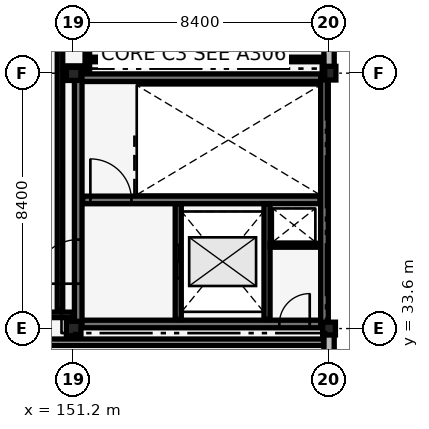
"""IFC4 building model, lengths in metres.
Left out: names, types, materials, properties, quantities, classifications, styles, units other than length and angle.
Written with IfcOpenShell. Run it as: python <this file> out.ifc"""

import sys

from ifc_helpers import new_model, si_unit, direction, frame, frame_2d, origin, origin_2d, place, context, subcontext, project, spatial, rectangle, extrude, element, fill, save


model = new_model("IFC4")
c1 = context("Model", 3, precision=1e-05, world=origin(), true_north=direction((0.0, 1.0)))
c2 = subcontext(c1, "Body", "Model", "MODEL_VIEW")
j1 = project(units=[si_unit("LENGTHUNIT", "METRE"), si_unit("PLANEANGLEUNIT", "RADIAN")], contexts=[c1])
p1 = place(None, origin())
s1 = spatial("IfcSite", under=j1, at=p1, CompositionType="ELEMENT")
p2 = place(p1, origin())
s2 = spatial("IfcBuilding", under=s1, at=p2, CompositionType="ELEMENT")
p3 = place(p2, frame((0.0, 0.0, 26.18)))
s3 = spatial("IfcBuildingStorey", under=s2, at=p3, CompositionType="ELEMENT", Elevation=26.18)
p4 = place(p3, frame((151.35, 33.75, 0.0), z_axis=(0.0, 0.0, 1.0), x_axis=(1.0, 0.0, 0.0)))
e1 = element("IfcWall", 1, at=p4, inside=s3, PredefinedType="SHEAR", context=c2, shape_type="SweptSolid", body=[
    extrude(rectangle(XDim=8.1, YDim=0.25, at=frame_2d((4.05, 0.0))), origin(), (0.0, 0.0, 1.0), 3.84),
])
p5 = place(p4, frame((6.615, 0.0, 0.0)))
e2 = element("IfcOpeningElement", 2, at=p5, cuts=e1, PredefinedType="OPENING", context=c2, shape_type="SweptSolid", body=[
    extrude(rectangle(XDim=1.0, YDim=2.15, at=frame_2d((0.5, 1.075))), frame((0.0, 0.135, 0.0), z_axis=(0.0, -1.0, 0.0), x_axis=(1.0, 0.0, 0.0)), (0.0, 0.0, 1.0), 0.27),
])
p6 = place(p3, frame((151.35, 41.85, 0.0), z_axis=(0.0, 0.0, 1.0), x_axis=(1.0, 0.0, 0.0)))
e3 = element("IfcWall", 3, at=p6, inside=s3, PredefinedType="SHEAR", context=c2, shape_type="SweptSolid", body=[
    extrude(rectangle(XDim=8.1, YDim=0.25, at=frame_2d((4.05, 0.0))), origin(), (0.0, 0.0, 1.0), 3.84),
])
p7 = place(p3, frame((151.35, 33.75, 0.0), z_axis=(0.0, 0.0, 1.0), x_axis=(0.0, 1.0, 0.0)))
e4 = element("IfcWall", 4, at=p7, inside=s3, PredefinedType="SHEAR", context=c2, shape_type="SweptSolid", body=[
    extrude(rectangle(XDim=8.1, YDim=0.25, at=frame_2d((4.05, 0.0))), origin(), (0.0, 0.0, 1.0), 3.84),
])
p8 = place(p7, frame((1.325, 0.0, 0.0)))
e5 = element("IfcOpeningElement", 5, at=p8, cuts=e4, PredefinedType="OPENING", context=c2, shape_type="SweptSolid", body=[
    extrude(rectangle(XDim=1.45, YDim=2.15, at=frame_2d((0.725, 1.075))), frame((0.0, 0.135, 0.0), z_axis=(0.0, -1.0, 0.0), x_axis=(1.0, 0.0, 0.0)), (0.0, 0.0, 1.0), 0.27),
])
p9 = place(p3, frame((159.45, 33.75, 0.0), z_axis=(0.0, 0.0, 1.0), x_axis=(0.0, 1.0, 0.0)))
e6 = element("IfcWall", 6, at=p9, inside=s3, PredefinedType="SHEAR", context=c2, shape_type="SweptSolid", body=[
    extrude(rectangle(XDim=8.1, YDim=0.25, at=frame_2d((4.05, 0.0))), origin(), (0.0, 0.0, 1.0), 3.84),
])
p10 = place(p3, frame((151.5, 37.83, 0.0), z_axis=(0.0, 0.0, 1.0), x_axis=(1.0, 0.0, 0.0)))
e7 = element("IfcWall", 7, at=p10, inside=s3, PredefinedType="SHEAR", context=c2, shape_type="SweptSolid", body=[
    extrude(rectangle(XDim=7.8, YDim=0.25, at=frame_2d((3.9, 0.0))), origin(), (0.0, 0.0, 1.0), 3.84),
])
p11 = place(p10, frame((0.25, 0.0, 0.0)))
e8 = element("IfcOpeningElement", 8, at=p11, cuts=e7, PredefinedType="OPENING", context=c2, shape_type="SweptSolid", body=[
    extrude(rectangle(XDim=1.35, YDim=2.15, at=frame_2d((0.675, 1.075))), frame((0.0, 0.135, 0.0), z_axis=(0.0, -1.0, 0.0), x_axis=(1.0, 0.0, 0.0)), (0.0, 0.0, 1.0), 0.27),
])
for number, where, z_axis, x_axis in (
    (9, (151.2, 33.6, 0.0), (0.0, 0.0, 1.0), (1.0, 0.0, 0.0)),
    (10, (151.2, 42.0, 0.0), (0.0, 0.0, 1.0), (1.0, 0.0, 0.0)),
):
    element("IfcColumn", number, at=place(p3, frame(where, z_axis=z_axis, x_axis=x_axis)), inside=s3, PredefinedType="COLUMN", context=c2, shape_type="SweptSolid", body=[
        extrude(rectangle(XDim=0.48, YDim=0.48, at=origin_2d()), origin(), (0.0, 0.0, 1.0), 3.84),
    ])
p12 = place(p3, frame((159.6, 33.6, 0.0), z_axis=(0.0, 0.0, 1.0), x_axis=(1.0, 0.0, 0.0)))
e11 = element("IfcColumn", 11, at=p12, inside=s3, PredefinedType="COLUMN", context=c2, shape_type="SweptSolid", body=[
    extrude(rectangle(XDim=0.42, YDim=0.42, at=origin_2d()), origin(), (0.0, 0.0, 1.0), 3.84),
])
p13 = place(p3, frame((159.6, 42.0, 0.0), z_axis=(0.0, 0.0, 1.0), x_axis=(1.0, 0.0, 0.0)))
e12 = element("IfcColumn", 12, at=p13, inside=s3, PredefinedType="COLUMN", context=c2, shape_type="SweptSolid", body=[
    extrude(rectangle(XDim=0.45, YDim=0.45, at=origin_2d()), origin(), (0.0, 0.0, 1.0), 3.84),
])
p14 = place(p3, frame((159.6, 25.41, 0.0), z_axis=(0.0, 0.0, 1.0), x_axis=(0.0, 1.0, 0.0)))
e13 = element("IfcWall", 13, at=p14, inside=s3, PredefinedType="SOLIDWALL", context=c2, shape_type="SweptSolid", body=[
    extrude(rectangle(XDim=7.995, YDim=0.34, at=frame_2d((3.998, 0.0))), origin(), (0.0, 0.0, 1.0), 3.48),
])
p15 = place(p14, frame((1.144, 0.0, 0.75)))
e14 = element("IfcOpeningElement", 14, at=p15, cuts=e13, PredefinedType="OPENING", context=c2, shape_type="SweptSolid", body=[
    extrude(rectangle(XDim=0.75, YDim=2.1, at=frame_2d((0.375, 1.05))), frame((0.0, 0.18, 0.0), z_axis=(0.0, -1.0, 0.0), x_axis=(1.0, 0.0, 0.0)), (0.0, 0.0, 1.0), 0.36),
])
p16 = place(p14, frame((2.743, 0.0, 0.75)))
e15 = element("IfcOpeningElement", 15, at=p16, cuts=e13, PredefinedType="OPENING", context=c2, shape_type="SweptSolid", body=[
    extrude(rectangle(XDim=0.75, YDim=2.1, at=frame_2d((0.375, 1.05))), frame((0.0, 0.18, 0.0), z_axis=(0.0, -1.0, 0.0), x_axis=(1.0, 0.0, 0.0)), (0.0, 0.0, 1.0), 0.36),
])
p17 = place(p14, frame((4.502, 0.0, 0.75)))
e16 = element("IfcOpeningElement", 16, at=p17, cuts=e13, PredefinedType="OPENING", context=c2, shape_type="SweptSolid", body=[
    extrude(rectangle(XDim=0.75, YDim=2.1, at=frame_2d((0.375, 1.05))), frame((0.0, 0.18, 0.0), z_axis=(0.0, -1.0, 0.0), x_axis=(1.0, 0.0, 0.0)), (0.0, 0.0, 1.0), 0.36),
])
p18 = place(p14, frame((6.101, 0.0, 0.75)))
e17 = element("IfcOpeningElement", 17, at=p18, cuts=e13, PredefinedType="OPENING", context=c2, shape_type="SweptSolid", body=[
    extrude(rectangle(XDim=0.75, YDim=2.1, at=frame_2d((0.375, 1.05))), frame((0.0, 0.18, 0.0), z_axis=(0.0, -1.0, 0.0), x_axis=(1.0, 0.0, 0.0)), (0.0, 0.0, 1.0), 0.36),
])
p19 = place(p3, frame((159.6, 42.21, 0.0), z_axis=(0.0, 0.0, 1.0), x_axis=(0.0, 1.0, 0.0)))
e18 = element("IfcWall", 18, at=p19, inside=s3, PredefinedType="SOLIDWALL", context=c2, shape_type="SweptSolid", body=[
    extrude(rectangle(XDim=7.995, YDim=0.34, at=frame_2d((3.998, 0.0))), origin(), (0.0, 0.0, 1.0), 3.48),
])
p20 = place(p19, frame((1.144, 0.0, 0.75)))
e19 = element("IfcOpeningElement", 19, at=p20, cuts=e18, PredefinedType="OPENING", context=c2, shape_type="SweptSolid", body=[
    extrude(rectangle(XDim=0.75, YDim=2.1, at=frame_2d((0.375, 1.05))), frame((0.0, 0.18, 0.0), z_axis=(0.0, -1.0, 0.0), x_axis=(1.0, 0.0, 0.0)), (0.0, 0.0, 1.0), 0.36),
])
p21 = place(p19, frame((2.743, 0.0, 0.75)))
e20 = element("IfcOpeningElement", 20, at=p21, cuts=e18, PredefinedType="OPENING", context=c2, shape_type="SweptSolid", body=[
    extrude(rectangle(XDim=0.75, YDim=2.1, at=frame_2d((0.375, 1.05))), frame((0.0, 0.18, 0.0), z_axis=(0.0, -1.0, 0.0), x_axis=(1.0, 0.0, 0.0)), (0.0, 0.0, 1.0), 0.36),
])
p22 = place(p19, frame((4.502, 0.0, 0.75)))
e21 = element("IfcOpeningElement", 21, at=p22, cuts=e18, PredefinedType="OPENING", context=c2, shape_type="SweptSolid", body=[
    extrude(rectangle(XDim=0.75, YDim=2.1, at=frame_2d((0.375, 1.05))), frame((0.0, 0.18, 0.0), z_axis=(0.0, -1.0, 0.0), x_axis=(1.0, 0.0, 0.0)), (0.0, 0.0, 1.0), 0.36),
])
p23 = place(p19, frame((6.101, 0.0, 0.75)))
e22 = element("IfcOpeningElement", 22, at=p23, cuts=e18, PredefinedType="OPENING", context=c2, shape_type="SweptSolid", body=[
    extrude(rectangle(XDim=0.75, YDim=2.1, at=frame_2d((0.375, 1.05))), frame((0.0, 0.18, 0.0), z_axis=(0.0, -1.0, 0.0), x_axis=(1.0, 0.0, 0.0)), (0.0, 0.0, 1.0), 0.36),
])
p24 = place(p3, frame((154.64, 33.9, 0.0), z_axis=(0.0, 0.0, 1.0), x_axis=(0.0, 1.0, 0.0)))
e23 = element("IfcWall", 23, at=p24, inside=s3, PredefinedType="SHEAR", context=c2, shape_type="SweptSolid", body=[
    extrude(rectangle(XDim=3.8, YDim=0.2, at=frame_2d((1.9, 0.0))), origin(), (0.0, 0.0, 1.0), 3.84),
])
p25 = place(p24, frame((1.35, 0.0, 0.0)))
e24 = element("IfcOpeningElement", 24, at=p25, cuts=e23, PredefinedType="OPENING", context=c2, shape_type="SweptSolid", body=[
    extrude(rectangle(XDim=1.1, YDim=2.15, at=frame_2d((0.55, 1.075))), frame((0.0, 0.11, 0.0), z_axis=(0.0, -1.0, 0.0), x_axis=(1.0, 0.0, 0.0)), (0.0, 0.0, 1.0), 0.22),
])
p26 = place(p3, frame((157.56, 33.9, 0.0), z_axis=(0.0, 0.0, 1.0), x_axis=(0.0, 1.0, 0.0)))
e25 = element("IfcWall", 25, at=p26, inside=s3, PredefinedType="SHEAR", context=c2, shape_type="SweptSolid", body=[
    extrude(rectangle(XDim=3.8, YDim=0.2, at=frame_2d((1.9, 0.0))), origin(), (0.0, 0.0, 1.0), 3.84),
])
p27 = place(p3, frame((157.66, 36.34, 0.0), z_axis=(0.0, 0.0, 1.0), x_axis=(1.0, 0.0, 0.0)))
e26 = element("IfcWall", 26, at=p27, inside=s3, PredefinedType="PARTITIONING", context=c2, shape_type="SweptSolid", body=[
    extrude(rectangle(XDim=1.62, YDim=0.13, at=frame_2d((0.81, 0.0))), origin(), (0.0, 0.0, 1.0), 3.84),
])
p28 = place(p3, frame((137.9, 34.05, 0.0), z_axis=(0.0, 0.0, 1.0), x_axis=(1.0, 0.0, 0.0)))
e27 = element("IfcWall", 27, at=p28, inside=s3, PredefinedType="PARTITIONING", context=c2, shape_type="SweptSolid", body=[
    extrude(rectangle(XDim=13.27, YDim=0.18, at=frame_2d((6.635, 0.0))), origin(), (0.0, 0.0, 1.0), 3.48),
])
p29 = place(p3, frame((150.75, 34.2, 0.0), z_axis=(0.0, 0.0, 1.0), x_axis=(0.0, 1.0, 0.0)))
e28 = element("IfcWall", 28, at=p29, inside=s3, PredefinedType="PARTITIONING", context=c2, shape_type="SweptSolid", body=[
    extrude(rectangle(XDim=38.2, YDim=0.18, at=frame_2d((19.1, 0.0))), origin(), (0.0, 0.0, 1.0), 3.84),
])
p30 = place(p3, frame((151.8, 42.45, 0.0), z_axis=(0.0, 0.0, 1.0), x_axis=(1.0, 0.0, 0.0)))
e29 = element("IfcWall", 29, at=p30, inside=s3, PredefinedType="PARTITIONING", context=c2, shape_type="SweptSolid", body=[
    extrude(rectangle(XDim=7.62, YDim=0.15, at=frame_2d((3.81, 0.0))), origin(), (0.0, 0.0, 1.0), 3.48),
])
p31 = place(p3, frame((151.65, 42.03, 0.0), z_axis=(0.0, 0.0, 1.0), x_axis=(0.0, 1.0, 0.0)))
e30 = element("IfcWall", 30, at=p31, inside=s3, PredefinedType="PARTITIONING", context=c2, shape_type="SweptSolid", body=[
    extrude(rectangle(XDim=30.37, YDim=0.15, at=frame_2d((15.185, 0.0))), origin(), (0.0, 0.0, 1.0), 3.84),
])
p32 = place(p3, frame((137.9, 33.15, 0.0), z_axis=(0.0, 0.0, 1.0), x_axis=(1.0, 0.0, 0.0)))
e31 = element("IfcWall", 31, at=p32, inside=s3, PredefinedType="PARTITIONING", context=c2, shape_type="SweptSolid", body=[
    extrude(rectangle(XDim=21.52, YDim=0.21, at=frame_2d((10.76, 0.0))), origin(), (0.0, 0.0, 1.0), 3.48),
])
p33 = place(p11, origin())
e32 = element("IfcDoor", 32, at=p33, inside=s3, OperationType="SINGLE_SWING_LEFT", PredefinedType="DOOR", context=c2, shape_type="SweptSolid", body=[
    extrude(rectangle(XDim=1.35, YDim=2.15, at=frame_2d((0.675, 1.075))), frame((0.0, 0.025, 0.0), z_axis=(0.0, -1.0, 0.0), x_axis=(1.0, 0.0, 0.0)), (0.0, 0.0, 1.0), 0.05),
])
fill(e8, e32)
p34 = place(p25, origin())
e33 = element("IfcDoor", 33, at=p34, inside=s3, OperationType="SLIDING_TO_LEFT", PredefinedType="DOOR", context=c2, shape_type="SweptSolid", body=[
    extrude(rectangle(XDim=1.1, YDim=2.15, at=frame_2d((0.55, 1.075))), frame((0.0, 0.025, 0.0), z_axis=(0.0, -1.0, 0.0), x_axis=(1.0, 0.0, 0.0)), (0.0, 0.0, 1.0), 0.05),
])
fill(e24, e33)
p35 = place(p8, origin())
e34 = element("IfcDoor", 34, at=p35, inside=s3, OperationType="DOUBLE_DOOR_SINGLE_SWING", PredefinedType="DOOR", context=c2, shape_type="SweptSolid", body=[
    extrude(rectangle(XDim=1.45, YDim=2.15, at=frame_2d((0.725, 1.075))), frame((0.0, 0.025, 0.0), z_axis=(0.0, -1.0, 0.0), x_axis=(1.0, 0.0, 0.0)), (0.0, 0.0, 1.0), 0.05),
])
fill(e5, e34)
p36 = place(p5, origin())
e35 = element("IfcDoor", 35, at=p36, inside=s3, OperationType="SINGLE_SWING_RIGHT", PredefinedType="DOOR", context=c2, shape_type="SweptSolid", body=[
    extrude(rectangle(XDim=1.0, YDim=2.15, at=frame_2d((0.5, 1.075))), frame((0.0, 0.025, 0.0), z_axis=(0.0, -1.0, 0.0), x_axis=(1.0, 0.0, 0.0)), (0.0, 0.0, 1.0), 0.05),
])
fill(e2, e35)
save(model, sys.argv[1])
